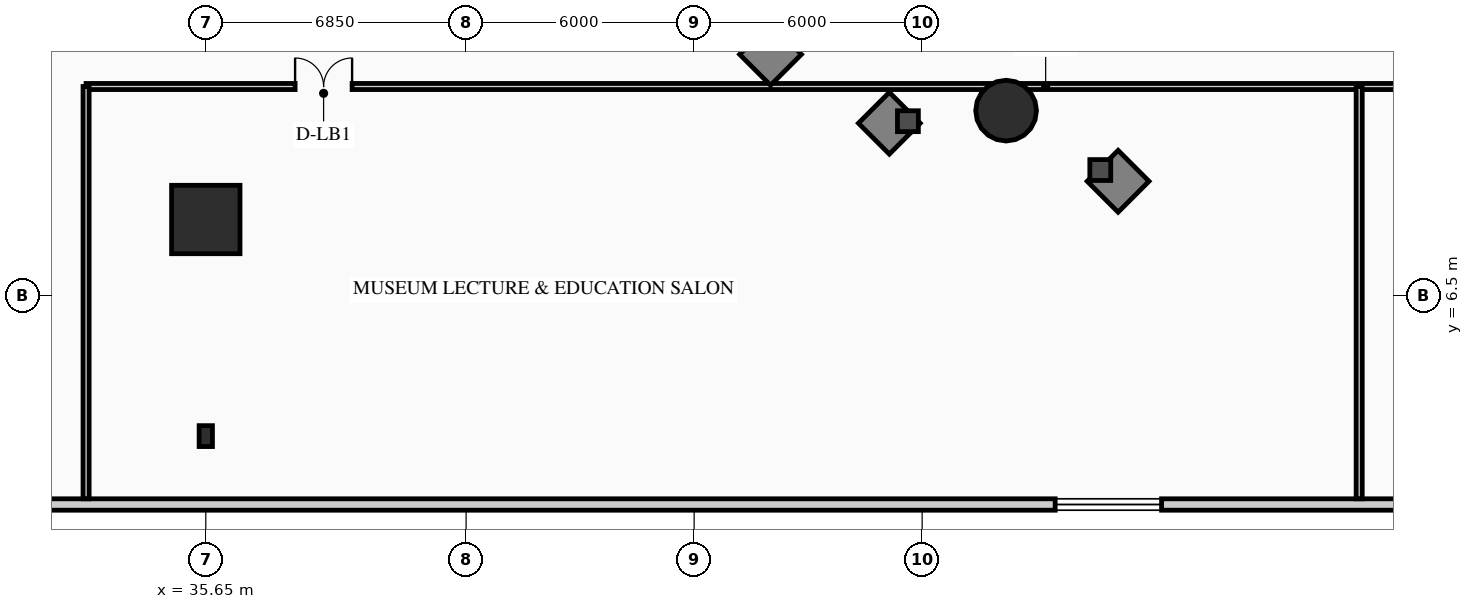
"""IFC4 building model, lengths in metres.
Left out: names, types, materials, properties, quantities, classifications, styles, units other than length and angle.
Written with IfcOpenShell. Run it as: python <this file> out.ifc"""

import sys

from ifc_helpers import new_model, si_unit, direction, frame, frame_2d, origin, origin_2d, place, context, subcontext, project, spatial, rectangle, hollow_rectangle, circle, extrude, source, transform, mapped, element, fill, save


model = new_model("IFC4")
c1 = context("Model", 3, precision=1e-05, world=origin(), true_north=direction((0.0, 1.0)))
c2 = subcontext(c1, "Body", "Model", "MODEL_VIEW")
j1 = project(units=[si_unit("LENGTHUNIT", "METRE"), si_unit("PLANEANGLEUNIT", "RADIAN")], contexts=[c1])
p1 = place(None, origin())
s1 = spatial("IfcSite", under=j1, at=p1, CompositionType="ELEMENT")
p2 = place(p1, origin())
s2 = spatial("IfcBuilding", under=s1, at=p2, CompositionType="ELEMENT")
p3 = place(p2, frame((0.0, 0.0, 9.0)))
s3 = spatial("IfcBuildingStorey", under=s2, at=p3, CompositionType="ELEMENT", Elevation=9.0)
p4 = place(p3, frame((56.709, 11.365, 0.0), z_axis=(0.0, 0.0, 1.0), x_axis=(1.0, 0.0, 0.0)))
e1 = element("IfcColumn", 1, at=p4, inside=s3, PredefinedType="USERDEFINED", context=c2, shape_type="SweptSolid", body=[
    extrude(circle(Radius=0.8, at=origin_2d()), origin(), (0.0, 0.0, 1.0), 4.2),
])
p5 = place(p3, frame((35.65, 8.5, 0.0), z_axis=(0.0, 0.0, 1.0), x_axis=(1.0, 0.0, 0.0)))
e2 = element("IfcColumn", 2, at=p5, inside=s3, PredefinedType="USERDEFINED", context=c2, shape_type="SweptSolid", body=[
    extrude(rectangle(XDim=1.8, YDim=1.8, at=origin_2d()), origin(), (0.0, 0.0, 1.0), 4.2),
])
p6 = place(p3, frame((35.65, 2.8, 0.0), z_axis=(0.0, 0.0, 1.0), x_axis=(1.0, 0.0, 0.0)))
e3 = element("IfcColumn", 3, at=p6, inside=s3, PredefinedType="PILASTER", context=c2, shape_type="SweptSolid", body=[
    extrude(hollow_rectangle(XDim=0.35, YDim=0.55, WallThickness=0.022, at=origin_2d()), origin(), (0.0, 0.0, 1.0), 4.2),
])
p7 = place(p3, frame((78.3, 1.0, 0.0), z_axis=(0.0, 0.0, 1.0), x_axis=(-1.0, 0.0, 0.0)))
e4 = element("IfcWall", 4, at=p7, inside=s3, PredefinedType="SOLIDWALL", context=c2, shape_type="SweptSolid", body=[
    extrude(rectangle(XDim=74.5, YDim=0.3, at=frame_2d((37.25, 0.0))), origin(), (0.0, 0.0, 1.0), 3.885),
])
m1 = source(origin(), c2, "Body", "SweptSolid", [
    extrude(rectangle(XDim=2.8, YDim=2.1, at=frame_2d((1.4, 1.05))), frame((0.0, 0.16, 0.0), z_axis=(0.0, -1.0, 0.0), x_axis=(1.0, 0.0, 0.0)), (0.0, 0.0, 1.0), 0.32),
])
p8 = place(p7, frame((17.5, 0.0, 0.8)))
e5 = element("IfcOpeningElement", 5, at=p8, cuts=e4, PredefinedType="OPENING", context=c2, shape_type="MappedRepresentation", body=[
    mapped(m1, transform((0.0, 0.0, 0.0), x_axis=(1.0, 0.0, 0.0), y_axis=(0.0, 1.0, 0.0), z_axis=(0.0, 0.0, 1.0), scale=1.0)),
])
p9 = place(p3, frame((32.5, 12.0, 0.0), z_axis=(0.0, 0.0, 1.0), x_axis=(1.0, 0.0, 0.0)))
e6 = element("IfcWall", 6, at=p9, inside=s3, PredefinedType="PARTITIONING", context=c2, shape_type="SweptSolid", body=[
    extrude(rectangle(XDim=49.05, YDim=0.16, at=frame_2d((24.525, 0.0))), origin(), (0.0, 0.0, 1.0), 2.929),
])
m2 = source(origin(), c2, "Body", "SweptSolid", [
    extrude(rectangle(XDim=1.5, YDim=2.02, at=frame_2d((0.75, 1.01))), frame((0.0, 0.09, 0.0), z_axis=(0.0, -1.0, 0.0), x_axis=(1.0, 0.0, 0.0)), (0.0, 0.0, 1.0), 0.18),
])
p10 = place(p9, frame((5.5, 0.0, 0.0)))
e7 = element("IfcOpeningElement", 7, at=p10, cuts=e6, PredefinedType="OPENING", context=c2, shape_type="MappedRepresentation", body=[
    mapped(m2, transform((0.0, 0.0, 0.0), x_axis=(1.0, 0.0, 0.0), y_axis=(0.0, 1.0, 0.0), z_axis=(0.0, 0.0, 1.0), scale=1.0)),
])
m3 = source(origin(), c2, "Body", "SweptSolid", [
    extrude(rectangle(XDim=1.0, YDim=2.015, at=frame_2d((0.5, 1.007))), frame((0.0, 0.09, 0.0), z_axis=(0.0, -1.0, 0.0), x_axis=(1.0, 0.0, 0.0)), (0.0, 0.0, 1.0), 0.18),
])
p11 = place(p9, frame((43.5, 0.0, 0.0)))
e8 = element("IfcOpeningElement", 8, at=p11, cuts=e6, PredefinedType="OPENING", context=c2, shape_type="MappedRepresentation", body=[
    mapped(m3, transform((0.0, 0.0, 0.0), x_axis=(1.0, 0.0, 0.0), y_axis=(0.0, 1.0, 0.0), z_axis=(0.0, 0.0, 1.0), scale=1.0)),
])
p12 = place(p3, frame((32.5, 1.15, 0.0), z_axis=(0.0, 0.0, 1.0), x_axis=(0.0, 1.0, 0.0)))
e9 = element("IfcWall", 9, at=p12, inside=s3, PredefinedType="PARTITIONING", context=c2, shape_type="SweptSolid", body=[
    extrude(rectangle(XDim=10.85, YDim=0.16, at=frame_2d((5.425, 0.0))), origin(), (0.0, 0.0, 1.0), 2.924),
])
p13 = place(p3, frame((66.0, 1.15, 0.0), z_axis=(0.0, 0.0, 1.0), x_axis=(0.0, 1.0, 0.0)))
e10 = element("IfcWall", 10, at=p13, inside=s3, PredefinedType="PARTITIONING", context=c2, shape_type="SweptSolid", body=[
    extrude(rectangle(XDim=10.85, YDim=0.16, at=frame_2d((5.425, 0.0))), origin(), (0.0, 0.0, 1.0), 2.929),
])
m4 = source(origin(), c2, "Body", "SweptSolid", [
    extrude(rectangle(XDim=2.8, YDim=2.1, at=frame_2d((1.4, 1.05))), frame((0.0, 0.03, 0.0), z_axis=(0.0, -1.0, 0.0), x_axis=(1.0, 0.0, 0.0)), (0.0, 0.0, 1.0), 0.06),
])
p14 = place(p8, origin())
e11 = element("IfcWindow", 11, at=p14, inside=s3, PartitioningType="TRIPLE_PANEL_VERTICAL", PredefinedType="WINDOW", context=c2, shape_type="MappedRepresentation", body=[
    mapped(m4, transform((0.0, 0.0, 0.0), x_axis=(1.0, 0.0, 0.0), y_axis=(0.0, 1.0, 0.0), z_axis=(0.0, 0.0, 1.0), scale=1.0)),
])
fill(e5, e11)
m5 = source(origin(), c2, "Body", "SweptSolid", [
    extrude(rectangle(XDim=1.5, YDim=2.02, at=frame_2d((0.75, 1.01))), frame((0.0, 0.025, 0.0), z_axis=(0.0, -1.0, 0.0), x_axis=(1.0, 0.0, 0.0)), (0.0, 0.0, 1.0), 0.05),
])
p15 = place(p10, origin())
e12 = element("IfcDoor", 12, at=p15, inside=s3, OperationType="DOUBLE_DOOR_SINGLE_SWING", PredefinedType="DOOR", context=c2, shape_type="MappedRepresentation", body=[
    mapped(m5, transform((0.0, 0.0, 0.0), x_axis=(1.0, 0.0, 0.0), y_axis=(0.0, 1.0, 0.0), z_axis=(0.0, 0.0, 1.0), scale=1.0)),
])
fill(e7, e12)
save(model, sys.argv[1])
